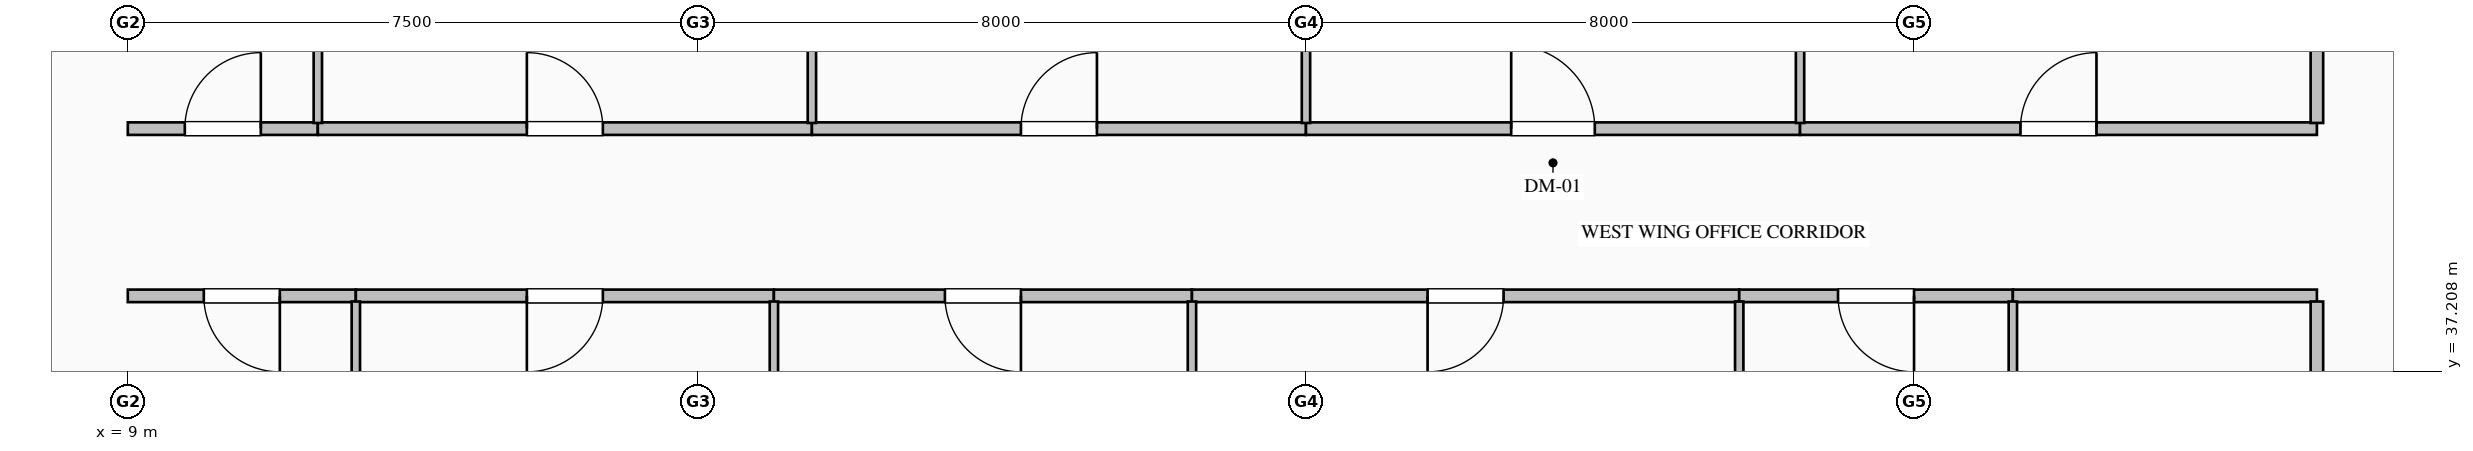
"""IFC4 building model, lengths in metres.
Left out: names, types, materials, properties, quantities, classifications, styles, units other than length and angle.
Written with IfcOpenShell. Run it as: python <this file> out.ifc"""

import sys

from ifc_helpers import new_model, si_unit, direction, frame, frame_2d, origin, place, context, subcontext, project, spatial, rectangle, extrude, element, fill, save


model = new_model("IFC4")
c1 = context("Model", 3, precision=1e-05, world=origin(), true_north=direction((0.0, 1.0)))
c2 = subcontext(c1, "Body", "Model", "MODEL_VIEW")
j1 = project(units=[si_unit("LENGTHUNIT", "METRE"), si_unit("PLANEANGLEUNIT", "RADIAN")], contexts=[c1])
p1 = place(None, origin())
s1 = spatial("IfcSite", under=j1, at=p1, CompositionType="ELEMENT")
p2 = place(p1, origin())
s2 = spatial("IfcBuilding", under=s1, at=p2, CompositionType="ELEMENT")
p3 = place(p2, frame((0.0, 0.0, 96.2)))
s3 = spatial("IfcBuildingStorey", under=s2, at=p3, CompositionType="ELEMENT", Elevation=96.2)
p4 = place(p3, frame((9.0, 40.4, 0.0), z_axis=(0.0, 0.0, 1.0), x_axis=(1.0, 0.0, 0.0)))
e1 = element("IfcWall", 1, at=p4, inside=s3, PredefinedType="PARTITIONING", context=c2, shape_type="SweptSolid", body=[
    extrude(rectangle(XDim=2.5, YDim=0.165, at=frame_2d((1.25, 0.0))), origin(), (0.0, 0.0, 1.0), 3.75),
])
p5 = place(p4, frame((0.75, 0.0, 0.0)))
e2 = element("IfcOpeningElement", 2, at=p5, cuts=e1, PredefinedType="OPENING", context=c2, shape_type="SweptSolid", body=[
    extrude(rectangle(XDim=1.0, YDim=2.15, at=frame_2d((0.5, 1.075))), frame((0.0, 0.093, 0.0), z_axis=(0.0, -1.0, 0.0), x_axis=(1.0, 0.0, 0.0)), (0.0, 0.0, 1.0), 0.185),
])
p6 = place(p3, frame((11.5, 40.4, 0.0), z_axis=(0.0, 0.0, 1.0), x_axis=(1.0, 0.0, 0.0)))
e3 = element("IfcWall", 3, at=p6, inside=s3, PredefinedType="PARTITIONING", context=c2, shape_type="SweptSolid", body=[
    extrude(rectangle(XDim=6.5, YDim=0.165, at=frame_2d((3.25, 0.0))), origin(), (0.0, 0.0, 1.0), 3.75),
])
p7 = place(p6, frame((2.75, 0.0, 0.0)))
e4 = element("IfcOpeningElement", 4, at=p7, cuts=e3, PredefinedType="OPENING", context=c2, shape_type="SweptSolid", body=[
    extrude(rectangle(XDim=1.0, YDim=2.15, at=frame_2d((0.5, 1.075))), frame((0.0, 0.093, 0.0), z_axis=(0.0, -1.0, 0.0), x_axis=(1.0, 0.0, 0.0)), (0.0, 0.0, 1.0), 0.185),
])
p8 = place(p3, frame((18.0, 40.4, 0.0), z_axis=(0.0, 0.0, 1.0), x_axis=(1.0, 0.0, 0.0)))
e5 = element("IfcWall", 5, at=p8, inside=s3, PredefinedType="PARTITIONING", context=c2, shape_type="SweptSolid", body=[
    extrude(rectangle(XDim=6.5, YDim=0.165, at=frame_2d((3.25, 0.0))), origin(), (0.0, 0.0, 1.0), 3.75),
])
p9 = place(p8, frame((2.75, 0.0, 0.0)))
e6 = element("IfcOpeningElement", 6, at=p9, cuts=e5, PredefinedType="OPENING", context=c2, shape_type="SweptSolid", body=[
    extrude(rectangle(XDim=1.0, YDim=2.15, at=frame_2d((0.5, 1.075))), frame((0.0, 0.093, 0.0), z_axis=(0.0, -1.0, 0.0), x_axis=(1.0, 0.0, 0.0)), (0.0, 0.0, 1.0), 0.185),
])
p10 = place(p3, frame((24.5, 40.4, 0.0), z_axis=(0.0, 0.0, 1.0), x_axis=(1.0, 0.0, 0.0)))
e7 = element("IfcWall", 7, at=p10, inside=s3, PredefinedType="PARTITIONING", context=c2, shape_type="SweptSolid", body=[
    extrude(rectangle(XDim=6.5, YDim=0.165, at=frame_2d((3.25, 0.0))), origin(), (0.0, 0.0, 1.0), 3.75),
])
p11 = place(p10, frame((2.7, 0.0, 0.0)))
e8 = element("IfcOpeningElement", 8, at=p11, cuts=e7, PredefinedType="OPENING", context=c2, shape_type="SweptSolid", body=[
    extrude(rectangle(XDim=1.1, YDim=2.2, at=frame_2d((0.55, 1.1))), frame((0.0, 0.093, 0.0), z_axis=(0.0, -1.0, 0.0), x_axis=(1.0, 0.0, 0.0)), (0.0, 0.0, 1.0), 0.185),
])
p12 = place(p3, frame((31.0, 40.4, 0.0), z_axis=(0.0, 0.0, 1.0), x_axis=(1.0, 0.0, 0.0)))
e9 = element("IfcWall", 9, at=p12, inside=s3, PredefinedType="PARTITIONING", context=c2, shape_type="SweptSolid", body=[
    extrude(rectangle(XDim=6.8, YDim=0.165, at=frame_2d((3.4, 0.0))), origin(), (0.0, 0.0, 1.0), 3.75),
])
p13 = place(p12, frame((2.9, 0.0, 0.0)))
e10 = element("IfcOpeningElement", 10, at=p13, cuts=e9, PredefinedType="OPENING", context=c2, shape_type="SweptSolid", body=[
    extrude(rectangle(XDim=1.0, YDim=2.15, at=frame_2d((0.5, 1.075))), frame((0.0, 0.093, 0.0), z_axis=(0.0, -1.0, 0.0), x_axis=(1.0, 0.0, 0.0)), (0.0, 0.0, 1.0), 0.185),
])
p14 = place(p3, frame((12.0, 38.2, 0.0), z_axis=(0.0, 0.0, 1.0), x_axis=(-1.0, 0.0, 0.0)))
e11 = element("IfcWall", 11, at=p14, inside=s3, PredefinedType="PARTITIONING", context=c2, shape_type="SweptSolid", body=[
    extrude(rectangle(XDim=3.0, YDim=0.165, at=frame_2d((1.5, 0.0))), origin(), (0.0, 0.0, 1.0), 3.75),
])
p15 = place(p14, frame((1.0, 0.0, 0.0)))
e12 = element("IfcOpeningElement", 12, at=p15, cuts=e11, PredefinedType="OPENING", context=c2, shape_type="SweptSolid", body=[
    extrude(rectangle(XDim=1.0, YDim=2.15, at=frame_2d((0.5, 1.075))), frame((0.0, 0.093, 0.0), z_axis=(0.0, -1.0, 0.0), x_axis=(1.0, 0.0, 0.0)), (0.0, 0.0, 1.0), 0.185),
])
p16 = place(p3, frame((17.5, 38.2, 0.0), z_axis=(0.0, 0.0, 1.0), x_axis=(-1.0, 0.0, 0.0)))
e13 = element("IfcWall", 13, at=p16, inside=s3, PredefinedType="PARTITIONING", context=c2, shape_type="SweptSolid", body=[
    extrude(rectangle(XDim=5.5, YDim=0.165, at=frame_2d((2.75, 0.0))), origin(), (0.0, 0.0, 1.0), 3.75),
])
p17 = place(p16, frame((2.25, 0.0, 0.0)))
e14 = element("IfcOpeningElement", 14, at=p17, cuts=e13, PredefinedType="OPENING", context=c2, shape_type="SweptSolid", body=[
    extrude(rectangle(XDim=1.0, YDim=2.15, at=frame_2d((0.5, 1.075))), frame((0.0, 0.093, 0.0), z_axis=(0.0, -1.0, 0.0), x_axis=(1.0, 0.0, 0.0)), (0.0, 0.0, 1.0), 0.185),
])
p18 = place(p3, frame((23.0, 38.2, 0.0), z_axis=(0.0, 0.0, 1.0), x_axis=(-1.0, 0.0, 0.0)))
e15 = element("IfcWall", 15, at=p18, inside=s3, PredefinedType="PARTITIONING", context=c2, shape_type="SweptSolid", body=[
    extrude(rectangle(XDim=5.5, YDim=0.165, at=frame_2d((2.75, 0.0))), origin(), (0.0, 0.0, 1.0), 3.75),
])
p19 = place(p18, frame((2.25, 0.0, 0.0)))
e16 = element("IfcOpeningElement", 16, at=p19, cuts=e15, PredefinedType="OPENING", context=c2, shape_type="SweptSolid", body=[
    extrude(rectangle(XDim=1.0, YDim=2.15, at=frame_2d((0.5, 1.075))), frame((0.0, 0.093, 0.0), z_axis=(0.0, -1.0, 0.0), x_axis=(1.0, 0.0, 0.0)), (0.0, 0.0, 1.0), 0.185),
])
p20 = place(p3, frame((30.2, 38.2, 0.0), z_axis=(0.0, 0.0, 1.0), x_axis=(-1.0, 0.0, 0.0)))
e17 = element("IfcWall", 17, at=p20, inside=s3, PredefinedType="PARTITIONING", context=c2, shape_type="SweptSolid", body=[
    extrude(rectangle(XDim=7.2, YDim=0.165, at=frame_2d((3.6, 0.0))), origin(), (0.0, 0.0, 1.0), 3.75),
])
p21 = place(p20, frame((3.1, 0.0, 0.0)))
e18 = element("IfcOpeningElement", 18, at=p21, cuts=e17, PredefinedType="OPENING", context=c2, shape_type="SweptSolid", body=[
    extrude(rectangle(XDim=1.0, YDim=2.15, at=frame_2d((0.5, 1.075))), frame((0.0, 0.093, 0.0), z_axis=(0.0, -1.0, 0.0), x_axis=(1.0, 0.0, 0.0)), (0.0, 0.0, 1.0), 0.185),
])
p22 = place(p3, frame((33.8, 38.2, 0.0), z_axis=(0.0, 0.0, 1.0), x_axis=(-1.0, 0.0, 0.0)))
e19 = element("IfcWall", 19, at=p22, inside=s3, PredefinedType="PARTITIONING", context=c2, shape_type="SweptSolid", body=[
    extrude(rectangle(XDim=3.6, YDim=0.165, at=frame_2d((1.8, 0.0))), origin(), (0.0, 0.0, 1.0), 3.75),
])
p23 = place(p22, frame((1.3, 0.0, 0.0)))
e20 = element("IfcOpeningElement", 20, at=p23, cuts=e19, PredefinedType="OPENING", context=c2, shape_type="SweptSolid", body=[
    extrude(rectangle(XDim=1.0, YDim=2.15, at=frame_2d((0.5, 1.075))), frame((0.0, 0.093, 0.0), z_axis=(0.0, -1.0, 0.0), x_axis=(1.0, 0.0, 0.0)), (0.0, 0.0, 1.0), 0.185),
])
p24 = place(p3, frame((37.8, 38.2, 0.0), z_axis=(0.0, 0.0, 1.0), x_axis=(-1.0, 0.0, 0.0)))
e21 = element("IfcWall", 21, at=p24, inside=s3, PredefinedType="PARTITIONING", context=c2, shape_type="SweptSolid", body=[
    extrude(rectangle(XDim=4.0, YDim=0.165, at=frame_2d((2.0, 0.0))), origin(), (0.0, 0.0, 1.0), 3.75),
])
p25 = place(p3, frame((37.8, 40.475, 0.0), z_axis=(0.0, 0.0, 1.0), x_axis=(0.0, 1.0, 0.0)))
e22 = element("IfcWall", 22, at=p25, inside=s3, PredefinedType="PARTITIONING", context=c2, shape_type="SweptSolid", body=[
    extrude(rectangle(XDim=3.651, YDim=0.165, at=frame_2d((1.825, 0.0))), origin(), (0.0, 0.0, 1.0), 3.75),
])
p26 = place(p3, frame((37.8, 31.6, 0.0), z_axis=(0.0, 0.0, 1.0), x_axis=(0.0, 1.0, 0.0)))
e23 = element("IfcWall", 23, at=p26, inside=s3, PredefinedType="PARTITIONING", context=c2, shape_type="SweptSolid", body=[
    extrude(rectangle(XDim=6.525, YDim=0.165, at=frame_2d((3.263, 0.0))), origin(), (0.0, 0.0, 1.0), 3.75),
])
p27 = place(p26, frame((2.763, 0.0, 0.0)))
e24 = element("IfcOpeningElement", 24, at=p27, cuts=e23, PredefinedType="OPENING", context=c2, shape_type="SweptSolid", body=[
    extrude(rectangle(XDim=1.0, YDim=2.15, at=frame_2d((0.5, 1.075))), frame((0.0, 0.093, 0.0), z_axis=(0.0, -1.0, 0.0), x_axis=(1.0, 0.0, 0.0)), (0.0, 0.0, 1.0), 0.185),
])
for number, where, z_axis, x_axis in (
    (25, (11.5, 51.648, 0.0), (0.0, 0.0, 1.0), (0.0, -1.0, 0.0)),
    (26, (18.0, 51.648, 0.0), (0.0, 0.0, 1.0), (0.0, -1.0, 0.0)),
):
    element("IfcWall", number, at=place(p3, frame(where, z_axis=z_axis, x_axis=x_axis)), inside=s3, PredefinedType="MOVABLE", context=c2, shape_type="SweptSolid", body=[
        extrude(rectangle(XDim=11.173, YDim=0.11, at=frame_2d((5.587, 0.0))), origin(), (0.0, 0.0, 1.0), 3.75),
    ])
p28 = place(p3, frame((24.5, 51.648, 0.0), z_axis=(0.0, 0.0, 1.0), x_axis=(0.0, -1.0, 0.0)))
e27 = element("IfcWall", 27, at=p28, inside=s3, PredefinedType="MOVABLE", context=c2, shape_type="SweptSolid", body=[
    extrude(rectangle(XDim=11.173, YDim=0.11, at=frame_2d((5.587, 0.0))), origin(), (0.0, 0.0, 1.0), 3.042),
])
p29 = place(p3, frame((31.0, 51.648, 0.0), z_axis=(0.0, 0.0, 1.0), x_axis=(0.0, -1.0, 0.0)))
e28 = element("IfcWall", 28, at=p29, inside=s3, PredefinedType="MOVABLE", context=c2, shape_type="SweptSolid", body=[
    extrude(rectangle(XDim=11.173, YDim=0.11, at=frame_2d((5.587, 0.0))), origin(), (0.0, 0.0, 1.0), 3.75),
])
for number, where, z_axis, x_axis in (
    (29, (12.0, 38.125, 0.0), (0.0, 0.0, 1.0), (0.0, -1.0, 0.0)),
    (30, (17.5, 38.125, 0.0), (0.0, 0.0, 1.0), (0.0, -1.0, 0.0)),
    (31, (23.0, 38.125, 0.0), (0.0, 0.0, 1.0), (0.0, -1.0, 0.0)),
    (32, (30.2, 38.125, 0.0), (0.0, 0.0, 1.0), (0.0, -1.0, 0.0)),
    (33, (33.8, 38.125, 0.0), (0.0, 0.0, 1.0), (0.0, -1.0, 0.0)),
):
    element("IfcWall", number, at=place(p3, frame(where, z_axis=z_axis, x_axis=x_axis)), inside=s3, PredefinedType="MOVABLE", context=c2, shape_type="SweptSolid", body=[
        extrude(rectangle(XDim=9.773, YDim=0.11, at=frame_2d((4.887, 0.0))), origin(), (0.0, 0.0, 1.0), 3.75),
    ])
p30 = place(p5, origin())
e34 = element("IfcDoor", 34, at=p30, inside=s3, OperationType="SINGLE_SWING_RIGHT", PredefinedType="DOOR", context=c2, shape_type="SweptSolid", body=[
    extrude(rectangle(XDim=1.0, YDim=2.15, at=frame_2d((0.5, 1.075))), frame((0.0, 0.025, 0.0), z_axis=(0.0, -1.0, 0.0), x_axis=(1.0, 0.0, 0.0)), (0.0, 0.0, 1.0), 0.05),
])
fill(e2, e34)
p31 = place(p7, origin())
e35 = element("IfcDoor", 35, at=p31, inside=s3, OperationType="SINGLE_SWING_LEFT", PredefinedType="DOOR", context=c2, shape_type="SweptSolid", body=[
    extrude(rectangle(XDim=1.0, YDim=2.15, at=frame_2d((0.5, 1.075))), frame((0.0, 0.025, 0.0), z_axis=(0.0, -1.0, 0.0), x_axis=(1.0, 0.0, 0.0)), (0.0, 0.0, 1.0), 0.05),
])
fill(e4, e35)
p32 = place(p9, origin())
e36 = element("IfcDoor", 36, at=p32, inside=s3, OperationType="SINGLE_SWING_RIGHT", PredefinedType="DOOR", context=c2, shape_type="SweptSolid", body=[
    extrude(rectangle(XDim=1.0, YDim=2.15, at=frame_2d((0.5, 1.075))), frame((0.0, 0.025, 0.0), z_axis=(0.0, -1.0, 0.0), x_axis=(1.0, 0.0, 0.0)), (0.0, 0.0, 1.0), 0.05),
])
fill(e6, e36)
p33 = place(p11, origin())
e37 = element("IfcDoor", 37, at=p33, inside=s3, OperationType="SINGLE_SWING_LEFT", PredefinedType="DOOR", context=c2, shape_type="SweptSolid", body=[
    extrude(rectangle(XDim=1.1, YDim=2.2, at=frame_2d((0.55, 1.1))), frame((0.0, 0.025, 0.0), z_axis=(0.0, -1.0, 0.0), x_axis=(1.0, 0.0, 0.0)), (0.0, 0.0, 1.0), 0.05),
])
fill(e8, e37)
p34 = place(p13, origin())
e38 = element("IfcDoor", 38, at=p34, inside=s3, OperationType="SINGLE_SWING_RIGHT", PredefinedType="DOOR", context=c2, shape_type="SweptSolid", body=[
    extrude(rectangle(XDim=1.0, YDim=2.15, at=frame_2d((0.5, 1.075))), frame((0.0, 0.025, 0.0), z_axis=(0.0, -1.0, 0.0), x_axis=(1.0, 0.0, 0.0)), (0.0, 0.0, 1.0), 0.05),
])
fill(e10, e38)
p35 = place(p15, origin())
e39 = element("IfcDoor", 39, at=p35, inside=s3, OperationType="SINGLE_SWING_LEFT", PredefinedType="DOOR", context=c2, shape_type="SweptSolid", body=[
    extrude(rectangle(XDim=1.0, YDim=2.15, at=frame_2d((0.5, 1.075))), frame((0.0, 0.025, 0.0), z_axis=(0.0, -1.0, 0.0), x_axis=(1.0, 0.0, 0.0)), (0.0, 0.0, 1.0), 0.05),
])
fill(e12, e39)
p36 = place(p17, origin())
e40 = element("IfcDoor", 40, at=p36, inside=s3, OperationType="SINGLE_SWING_RIGHT", PredefinedType="DOOR", context=c2, shape_type="SweptSolid", body=[
    extrude(rectangle(XDim=1.0, YDim=2.15, at=frame_2d((0.5, 1.075))), frame((0.0, 0.025, 0.0), z_axis=(0.0, -1.0, 0.0), x_axis=(1.0, 0.0, 0.0)), (0.0, 0.0, 1.0), 0.05),
])
fill(e14, e40)
p37 = place(p19, origin())
e41 = element("IfcDoor", 41, at=p37, inside=s3, OperationType="SINGLE_SWING_LEFT", PredefinedType="DOOR", context=c2, shape_type="SweptSolid", body=[
    extrude(rectangle(XDim=1.0, YDim=2.15, at=frame_2d((0.5, 1.075))), frame((0.0, 0.025, 0.0), z_axis=(0.0, -1.0, 0.0), x_axis=(1.0, 0.0, 0.0)), (0.0, 0.0, 1.0), 0.05),
])
fill(e16, e41)
p38 = place(p21, origin())
e42 = element("IfcDoor", 42, at=p38, inside=s3, OperationType="SINGLE_SWING_RIGHT", PredefinedType="DOOR", context=c2, shape_type="SweptSolid", body=[
    extrude(rectangle(XDim=1.0, YDim=2.15, at=frame_2d((0.5, 1.075))), frame((0.0, 0.025, 0.0), z_axis=(0.0, -1.0, 0.0), x_axis=(1.0, 0.0, 0.0)), (0.0, 0.0, 1.0), 0.05),
])
fill(e18, e42)
p39 = place(p23, origin())
e43 = element("IfcDoor", 43, at=p39, inside=s3, OperationType="SINGLE_SWING_LEFT", PredefinedType="DOOR", context=c2, shape_type="SweptSolid", body=[
    extrude(rectangle(XDim=1.0, YDim=2.15, at=frame_2d((0.5, 1.075))), frame((0.0, 0.025, 0.0), z_axis=(0.0, -1.0, 0.0), x_axis=(1.0, 0.0, 0.0)), (0.0, 0.0, 1.0), 0.05),
])
fill(e20, e43)
save(model, sys.argv[1])
